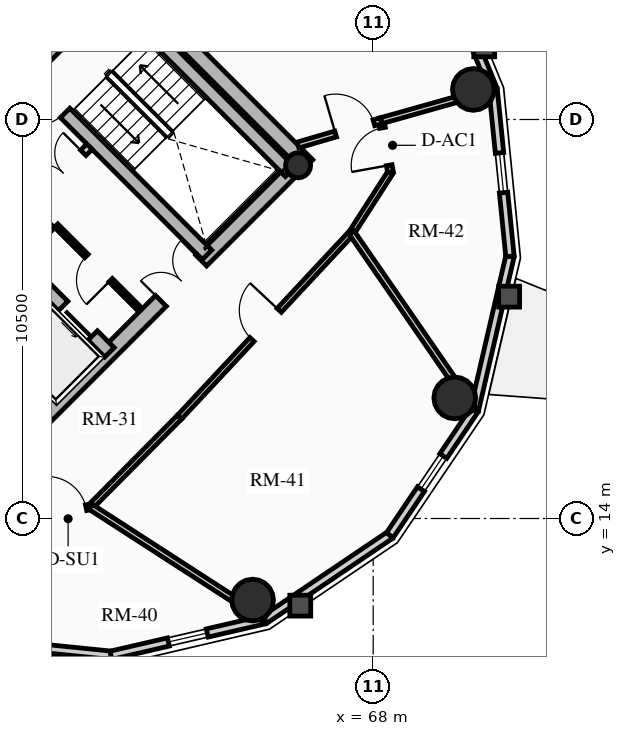
"""IFC4 building model, lengths in metres.
Left out: names, types, materials, properties, quantities, classifications, styles, units other than length and angle.
Written with IfcOpenShell. Run it as: python <this file> out.ifc"""

import sys

from ifc_helpers import new_model, si_unit, direction, frame, frame_2d, origin, origin_2d, place, context, subcontext, project, spatial, rectangle, circle, hollow_circle, extrude, source, transform, mapped, element, fill, save


model = new_model("IFC4")
c1 = context("Model", 3, precision=1e-05, world=origin(), true_north=direction((0.0, 1.0)))
c2 = subcontext(c1, "Body", "Model", "MODEL_VIEW")
j1 = project(units=[si_unit("LENGTHUNIT", "METRE"), si_unit("PLANEANGLEUNIT", "RADIAN")], contexts=[c1])
p1 = place(None, origin())
s1 = spatial("IfcSite", under=j1, at=p1, CompositionType="ELEMENT")
p2 = place(p1, origin())
s2 = spatial("IfcBuilding", under=s1, at=p2, CompositionType="ELEMENT")
p3 = place(p2, frame((0.0, 0.0, 205.39)))
s3 = spatial("IfcBuildingStorey", under=s2, at=p3, CompositionType="ELEMENT", Elevation=205.39)
p4 = place(p3, frame((66.268, 23.298, 0.0), z_axis=(0.0, 0.0, 1.0), x_axis=(-0.707106781187, 0.707106781187, 0.0)))
e1 = element("IfcWall", 1, at=p4, inside=s3, PredefinedType="SHEAR", context=c2, shape_type="SweptSolid", body=[
    extrude(rectangle(XDim=14.1, YDim=0.4, at=frame_2d((7.05, 0.0))), origin(), (0.0, 0.0, 1.0), 2.91),
])
p5 = place(p3, frame((58.561, 15.873, 0.0), z_axis=(0.0, 0.0, 1.0), x_axis=(0.707106781187, 0.707106781187, 0.0)))
e2 = element("IfcWall", 2, at=p5, inside=s3, PredefinedType="SHEAR", context=c2, shape_type="SweptSolid", body=[
    extrude(rectangle(XDim=10.7, YDim=0.4, at=frame_2d((5.35, 0.0))), origin(), (0.0, 0.0, 1.0), 2.91),
])
m1 = source(origin(), c2, "Body", "SweptSolid", [
    extrude(rectangle(XDim=1.5, YDim=2.02, at=frame_2d((0.75, 1.01))), frame((0.0, 0.21, 0.0), z_axis=(0.0, -1.0, 0.0), x_axis=(1.0, 0.0, 0.0)), (0.0, 0.0, 1.0), 0.42),
])
p6 = place(p5, frame((5.45, 0.0, 0.0)))
e3 = element("IfcOpeningElement", 3, at=p6, cuts=e2, PredefinedType="OPENING", context=c2, shape_type="MappedRepresentation", body=[
    mapped(m1, transform((0.0, 0.0, 0.0), x_axis=(1.0, 0.0, 0.0), y_axis=(0.0, 1.0, 0.0), z_axis=(0.0, 0.0, 1.0), scale=1.0)),
])
p7 = place(p3, frame((61.06, 18.373, 0.0), z_axis=(0.0, 0.0, 1.0), x_axis=(-0.707106781187, 0.707106781187, 0.0)))
e4 = element("IfcWall", 4, at=p7, inside=s3, PredefinedType="SHEAR", context=c2, shape_type="SweptSolid", body=[
    extrude(rectangle(XDim=13.7, YDim=0.35, at=frame_2d((6.85, 0.0))), origin(), (0.0, 0.0, 1.0), 2.91),
])
m2 = source(origin(), c2, "Body", "SweptSolid", [
    extrude(rectangle(XDim=1.1, YDim=2.015, at=frame_2d((0.55, 1.007))), frame((0.0, 0.185, 0.0), z_axis=(0.0, -1.0, 0.0), x_axis=(1.0, 0.0, 0.0)), (0.0, 0.0, 1.0), 0.37),
])
p8 = place(p7, frame((4.85, 0.0, 0.0)))
e5 = element("IfcOpeningElement", 5, at=p8, cuts=e4, PredefinedType="OPENING", context=c2, shape_type="MappedRepresentation", body=[
    mapped(m2, transform((0.0, 0.0, 0.0), x_axis=(1.0, 0.0, 0.0), y_axis=(0.0, 1.0, 0.0), z_axis=(0.0, 0.0, 1.0), scale=1.0)),
])
p9 = place(p7, frame((0.625, 0.0, 0.0)))
e6 = element("IfcOpeningElement", 6, at=p9, cuts=e4, PredefinedType="OPENING", context=c2, shape_type="MappedRepresentation", body=[
    mapped(m2, transform((0.0, 0.0, 0.0), x_axis=(1.0, 0.0, 0.0), y_axis=(0.0, 1.0, 0.0), z_axis=(0.0, 0.0, 1.0), scale=1.0)),
])
p10 = place(p7, frame((2.625, 0.0, 0.0)))
e7 = element("IfcOpeningElement", 7, at=p10, cuts=e4, PredefinedType="OPENING", context=c2, shape_type="MappedRepresentation", body=[
    mapped(m2, transform((0.0, 0.0, 0.0), x_axis=(1.0, 0.0, 0.0), y_axis=(0.0, 1.0, 0.0), z_axis=(0.0, 0.0, 1.0), scale=1.0)),
])
m3 = source(origin(), c2, "Body", "SweptSolid", [
    extrude(rectangle(XDim=1.15, YDim=2.02, at=frame_2d((0.575, 1.01))), frame((0.0, 0.185, 0.0), z_axis=(0.0, -1.0, 0.0), x_axis=(1.0, 0.0, 0.0)), (0.0, 0.0, 1.0), 0.37),
])
p11 = place(p7, frame((7.27, 0.0, 0.0)))
e8 = element("IfcOpeningElement", 8, at=p11, cuts=e4, PredefinedType="OPENING", context=c2, shape_type="MappedRepresentation", body=[
    mapped(m3, transform((0.0, 0.0, 0.0), x_axis=(1.0, 0.0, 0.0), y_axis=(0.0, 1.0, 0.0), z_axis=(0.0, 0.0, 1.0), scale=1.0)),
])
p12 = place(p3, frame((63.627, 20.94, 0.0), z_axis=(0.0, 0.0, 1.0), x_axis=(-0.707119496762, 0.707094065383, 0.0)))
e9 = element("IfcWall", 9, at=p12, inside=s3, PredefinedType="SHEAR", context=c2, shape_type="SweptSolid", body=[
    extrude(rectangle(XDim=9.6, YDim=0.35, at=frame_2d((4.8, 0.0))), origin(), (0.0, 0.0, 1.0), 2.91),
])
p13 = place(p12, frame((5.28, 0.0, 0.0)))
e10 = element("IfcOpeningElement", 10, at=p13, cuts=e9, PredefinedType="OPENING", context=c2, shape_type="MappedRepresentation", body=[
    mapped(m3, transform((0.0, 0.0, 0.0), x_axis=(1.0, 0.0, 0.0), y_axis=(0.0, 1.0, 0.0), z_axis=(0.0, 0.0, 1.0), scale=1.0)),
])
p14 = place(p3, frame((65.812, 23.125, 0.0), z_axis=(0.0, 0.0, 1.0), x_axis=(-0.707106781187, 0.707106781187, 0.0)))
e11 = element("IfcWall", 11, at=p14, inside=s3, PredefinedType="SHEAR", context=c2, shape_type="SweptSolid", body=[
    extrude(rectangle(XDim=6.695, YDim=0.35, at=frame_2d((3.348, 0.0))), origin(), (0.0, 0.0, 1.0), 2.91),
])
p15 = place(p3, frame((58.893, 25.674, 0.0), z_axis=(0.0, 0.0, 1.0), x_axis=(0.707106781187, 0.707106781187, 0.0)))
e12 = element("IfcWall", 12, at=p15, inside=s3, PredefinedType="SHEAR", context=c2, shape_type="SweptSolid", body=[
    extrude(rectangle(XDim=3.285, YDim=0.35, at=frame_2d((1.643, 0.0))), origin(), (0.0, 0.0, 1.0), 2.91),
])
p16 = place(p3, frame((66.024, 23.294, 0.0), z_axis=(0.0, 0.0, 1.0), x_axis=(0.707106781187, 0.707106781187, 0.0)))
e13 = element("IfcColumn", 13, at=p16, inside=s3, PredefinedType="COLUMN", context=c2, shape_type="SweptSolid", body=[
    extrude(hollow_circle(Radius=0.33, WallThickness=0.025, at=origin_2d()), origin(), (0.0, 0.0, 1.0), 2.91),
])
for number, where, z_axis, x_axis in (
    (14, (64.827, 11.854, 0.0), (0.0, 0.0, 1.0), (1.0, 0.0, 0.0)),
    (15, (70.146, 17.173, 0.0), (0.0, 0.0, 1.0), (1.0, 0.0, 0.0)),
    (16, (70.635, 25.291, 0.0), (0.0, 0.0, 1.0), (1.0, 0.0, 0.0)),
):
    element("IfcColumn", number, at=place(p3, frame(where, z_axis=z_axis, x_axis=x_axis)), inside=s3, PredefinedType="USERDEFINED", context=c2, shape_type="SweptSolid", body=[
        extrude(circle(Radius=0.55, at=origin_2d()), origin(), (0.0, 0.0, 1.0), 2.91),
    ])
p17 = place(p3, frame((61.1, 10.401, 0.0), z_axis=(0.0, 0.0, 1.0), x_axis=(-0.994929930991, 0.100570534541, 0.0)))
e17 = element("IfcWall", 17, at=p17, inside=s3, PredefinedType="SOLIDWALL", context=c2, shape_type="SweptSolid", body=[
    extrude(rectangle(XDim=4.418, YDim=0.22, at=frame_2d((2.209, 0.0))), origin(), (0.0, 0.0, 1.0), 2.322),
])
m4 = source(origin(), c2, "Body", "SweptSolid", [
    extrude(rectangle(XDim=1.05, YDim=1.3, at=frame_2d((0.525, 0.65))), frame((0.0, 0.12, 0.0), z_axis=(0.0, -1.0, 0.0), x_axis=(1.0, 0.0, 0.0)), (0.0, 0.0, 1.0), 0.24),
])
p18 = place(p17, frame((1.684, 0.0, 0.65)))
e18 = element("IfcOpeningElement", 18, at=p18, cuts=e17, PredefinedType="OPENING", context=c2, shape_type="MappedRepresentation", body=[
    mapped(m4, transform((0.0, 0.0, 0.0), x_axis=(1.0, 0.0, 0.0), y_axis=(0.0, 1.0, 0.0), z_axis=(0.0, 0.0, 1.0), scale=1.0)),
])
p19 = place(p3, frame((65.144, 11.337, 0.0), z_axis=(0.0, 0.0, 1.0), x_axis=(-0.974249228678, -0.225473813158, 0.0)))
e19 = element("IfcWall", 19, at=p19, inside=s3, PredefinedType="SOLIDWALL", context=c2, shape_type="SweptSolid", body=[
    extrude(rectangle(XDim=4.15, YDim=0.22, at=frame_2d((2.075, 0.0))), origin(), (0.0, 0.0, 1.0), 2.322),
])
p20 = place(p19, frame((1.55, 0.0, 0.65)))
e20 = element("IfcOpeningElement", 20, at=p20, cuts=e19, PredefinedType="OPENING", context=c2, shape_type="MappedRepresentation", body=[
    mapped(m4, transform((0.0, 0.0, 0.0), x_axis=(1.0, 0.0, 0.0), y_axis=(0.0, 1.0, 0.0), z_axis=(0.0, 0.0, 1.0), scale=1.0)),
])
p21 = place(p3, frame((68.439, 13.561, 0.0), z_axis=(0.0, 0.0, 1.0), x_axis=(-0.828833723692, -0.559495003079, 0.0)))
e21 = element("IfcWall", 21, at=p21, inside=s3, PredefinedType="SOLIDWALL", context=c2, shape_type="SweptSolid", body=[
    extrude(rectangle(XDim=3.976, YDim=0.22, at=frame_2d((1.988, 0.0))), origin(), (0.0, 0.0, 1.0), 2.322),
])
p22 = place(p3, frame((70.663, 16.856, 0.0), z_axis=(0.0, 0.0, 1.0), x_axis=(-0.559495003079, -0.828833723692, 0.0)))
e22 = element("IfcWall", 22, at=p22, inside=s3, PredefinedType="SOLIDWALL", context=c2, shape_type="SweptSolid", body=[
    extrude(rectangle(XDim=3.976, YDim=0.22, at=frame_2d((1.988, 0.0))), origin(), (0.0, 0.0, 1.0), 2.322),
])
p23 = place(p22, frame((1.463, 0.0, 0.65)))
e23 = element("IfcOpeningElement", 23, at=p23, cuts=e22, PredefinedType="OPENING", context=c2, shape_type="MappedRepresentation", body=[
    mapped(m4, transform((0.0, 0.0, 0.0), x_axis=(1.0, 0.0, 0.0), y_axis=(0.0, 1.0, 0.0), z_axis=(0.0, 0.0, 1.0), scale=1.0)),
])
p24 = place(p3, frame((71.599, 20.9, 0.0), z_axis=(0.0, 0.0, 1.0), x_axis=(-0.225473813158, -0.974249228678, 0.0)))
e24 = element("IfcWall", 24, at=p24, inside=s3, PredefinedType="SOLIDWALL", context=c2, shape_type="SweptSolid", body=[
    extrude(rectangle(XDim=4.15, YDim=0.22, at=frame_2d((2.075, 0.0))), origin(), (0.0, 0.0, 1.0), 2.322),
])
p25 = place(p3, frame((71.155, 25.295, 0.0), z_axis=(0.0, 0.0, 1.0), x_axis=(0.100570534541, -0.994929930991, 0.0)))
e25 = element("IfcWall", 25, at=p25, inside=s3, PredefinedType="SOLIDWALL", context=c2, shape_type="SweptSolid", body=[
    extrude(rectangle(XDim=4.418, YDim=0.22, at=frame_2d((2.209, 0.0))), origin(), (0.0, 0.0, 1.0), 2.322),
])
p26 = place(p25, frame((1.684, 0.0, 0.65)))
e26 = element("IfcOpeningElement", 26, at=p26, cuts=e25, PredefinedType="OPENING", context=c2, shape_type="MappedRepresentation", body=[
    mapped(m4, transform((0.0, 0.0, 0.0), x_axis=(1.0, 0.0, 0.0), y_axis=(0.0, 1.0, 0.0), z_axis=(0.0, 0.0, 1.0), scale=1.0)),
])
p27 = place(p3, frame((69.374, 29.613, 0.0), z_axis=(0.0, 0.0, 1.0), x_axis=(0.381309704956, -0.924447353237, 0.0)))
e27 = element("IfcWall", 27, at=p27, inside=s3, PredefinedType="SOLIDWALL", context=c2, shape_type="SweptSolid", body=[
    extrude(rectangle(XDim=4.671, YDim=0.22, at=frame_2d((2.335, 0.0))), origin(), (0.0, 0.0, 1.0), 2.322),
])
p28 = place(p3, frame((58.214, 21.467, 0.0), z_axis=(0.0, 0.0, 1.0), x_axis=(0.707106781187, 0.707106781187, 0.0)))
e28 = element("IfcWall", 28, at=p28, inside=s3, PredefinedType="PARTITIONING", context=c2, shape_type="SweptSolid", body=[
    extrude(rectangle(XDim=3.28, YDim=0.2, at=frame_2d((1.64, 0.0))), origin(), (0.0, 0.0, 1.0), 2.685),
])
m5 = source(origin(), c2, "Body", "SweptSolid", [
    extrude(rectangle(XDim=1.5, YDim=2.02, at=frame_2d((0.75, 1.01))), frame((0.0, 0.11, 0.0), z_axis=(0.0, -1.0, 0.0), x_axis=(1.0, 0.0, 0.0)), (0.0, 0.0, 1.0), 0.22),
])
p29 = place(p28, frame((1.55, 0.0, 0.0)))
e29 = element("IfcOpeningElement", 29, at=p29, cuts=e28, PredefinedType="OPENING", context=c2, shape_type="MappedRepresentation", body=[
    mapped(m5, transform((0.0, 0.0, 0.0), x_axis=(1.0, 0.0, 0.0), y_axis=(0.0, 1.0, 0.0), z_axis=(0.0, 0.0, 1.0), scale=1.0)),
])
p30 = place(p3, frame((61.835, 19.529, 0.0), z_axis=(0.0, 0.0, 1.0), x_axis=(-0.707146413884, 0.707067146267, 0.0)))
e30 = element("IfcWall", 30, at=p30, inside=s3, PredefinedType="PARTITIONING", context=c2, shape_type="SweptSolid", body=[
    extrude(rectangle(XDim=3.08, YDim=0.125, at=frame_2d((1.54, 0.0))), origin(), (0.0, 0.0, 1.0), 2.685),
])
m6 = source(origin(), c2, "Body", "SweptSolid", [
    extrude(rectangle(XDim=0.9, YDim=2.005, at=frame_2d((0.45, 1.002))), frame((0.0, 0.073, 0.0), z_axis=(0.0, -1.0, 0.0), x_axis=(1.0, 0.0, 0.0)), (0.0, 0.0, 1.0), 0.145),
])
p31 = place(p30, frame((1.05, 0.0, 0.0)))
e31 = element("IfcOpeningElement", 31, at=p31, cuts=e30, PredefinedType="OPENING", context=c2, shape_type="MappedRepresentation", body=[
    mapped(m6, transform((0.0, 0.0, 0.0), x_axis=(1.0, 0.0, 0.0), y_axis=(0.0, 1.0, 0.0), z_axis=(0.0, 0.0, 1.0), scale=1.0)),
])
p32 = place(p3, frame((58.794, 20.915, 0.0), z_axis=(0.0, 0.0, 1.0), x_axis=(0.707106781187, 0.707106781187, 0.0)))
e32 = element("IfcWall", 32, at=p32, inside=s3, PredefinedType="PARTITIONING", context=c2, shape_type="SweptSolid", body=[
    extrude(rectangle(XDim=1.1, YDim=0.125, at=frame_2d((0.55, 0.0))), origin(), (0.0, 0.0, 1.0), 2.685),
])
p33 = place(p3, frame((59.008, 13.963, 0.0), z_axis=(0.0, 0.0, 1.0), x_axis=(0.976020856791, 0.21767702476, 0.0)))
e33 = element("IfcWall", 33, at=p33, inside=s3, PredefinedType="PARTITIONING", context=c2, shape_type="SweptSolid", body=[
    extrude(rectangle(XDim=1.593, YDim=0.15, at=frame_2d((0.796, 0.0))), origin(), (0.0, 0.0, 1.0), 2.255),
])
m7 = source(origin(), c2, "Body", "SweptSolid", [
    extrude(rectangle(XDim=1.05, YDim=2.015, at=frame_2d((0.525, 1.007))), frame((0.0, 0.085, 0.0), z_axis=(0.0, -1.0, 0.0), x_axis=(1.0, 0.0, 0.0)), (0.0, 0.0, 1.0), 0.17),
])
p34 = place(p33, frame((0.423, 0.0, 0.0)))
e34 = element("IfcOpeningElement", 34, at=p34, cuts=e33, PredefinedType="OPENING", context=c2, shape_type="MappedRepresentation", body=[
    mapped(m7, transform((0.0, 0.0, 0.0), x_axis=(1.0, 0.0, 0.0), y_axis=(0.0, 1.0, 0.0), z_axis=(0.0, 0.0, 1.0), scale=1.0)),
])
p35 = place(p3, frame((60.562, 14.31, 0.0), z_axis=(0.0, 0.0, 1.0), x_axis=(0.704566236161, 0.709638230975, 0.0)))
e35 = element("IfcWall", 35, at=p35, inside=s3, PredefinedType="PARTITIONING", context=c2, shape_type="SweptSolid", body=[
    extrude(rectangle(XDim=3.321, YDim=0.15, at=frame_2d((1.661, 0.0))), origin(), (0.0, 0.0, 1.0), 2.322),
])
p36 = place(p3, frame((62.903, 16.667, 0.0), z_axis=(0.0, 0.0, 1.0), x_axis=(0.682371947497, 0.731005147225, 0.0)))
e36 = element("IfcWall", 36, at=p36, inside=s3, PredefinedType="PARTITIONING", context=c2, shape_type="SweptSolid", body=[
    extrude(rectangle(XDim=6.642, YDim=0.15, at=frame_2d((3.321, 0.0))), origin(), (0.0, 0.0, 1.0), 2.255),
])
p37 = place(p36, frame((2.796, 0.0, 0.0)))
e37 = element("IfcOpeningElement", 37, at=p37, cuts=e36, PredefinedType="OPENING", context=c2, shape_type="MappedRepresentation", body=[
    mapped(m7, transform((0.0, 0.0, 0.0), x_axis=(1.0, 0.0, 0.0), y_axis=(0.0, 1.0, 0.0), z_axis=(0.0, 0.0, 1.0), scale=1.0)),
])
p38 = place(p3, frame((67.435, 21.521, 0.0), z_axis=(0.0, 0.0, 1.0), x_axis=(0.540777197838, 0.841165870859, 0.0)))
e38 = element("IfcWall", 38, at=p38, inside=s3, PredefinedType="PARTITIONING", context=c2, shape_type="SweptSolid", body=[
    extrude(rectangle(XDim=1.888, YDim=0.15, at=frame_2d((0.944, 0.0))), origin(), (0.0, 0.0, 1.0), 2.255),
])
p39 = place(p3, frame((68.456, 23.11, 0.0), z_axis=(0.0, 0.0, 1.0), x_axis=(-0.1772522795, 0.984165448191, 0.0)))
e39 = element("IfcWall", 39, at=p39, inside=s3, PredefinedType="PARTITIONING", context=c2, shape_type="SweptSolid", body=[
    extrude(rectangle(XDim=1.382, YDim=0.15, at=frame_2d((0.691, 0.0))), origin(), (0.0, 0.0, 1.0), 2.322),
])
m8 = source(origin(), c2, "Body", "SweptSolid", [
    extrude(rectangle(XDim=1.0, YDim=2.015, at=frame_2d((0.5, 1.007))), frame((0.0, 0.085, 0.0), z_axis=(0.0, -1.0, 0.0), x_axis=(1.0, 0.0, 0.0)), (0.0, 0.0, 1.0), 0.17),
])
p40 = place(p39, frame((0.191, 0.0, 0.0)))
e40 = element("IfcOpeningElement", 40, at=p40, cuts=e39, PredefinedType="OPENING", context=c2, shape_type="MappedRepresentation", body=[
    mapped(m8, transform((0.0, 0.0, 0.0), x_axis=(1.0, 0.0, 0.0), y_axis=(0.0, 1.0, 0.0), z_axis=(0.0, 0.0, 1.0), scale=1.0)),
])
p41 = place(p3, frame((60.562, 14.31, 0.0), z_axis=(0.0, 0.0, 1.0), x_axis=(0.839858797161, -0.542804938105, 0.0)))
e41 = element("IfcWall", 41, at=p41, inside=s3, PredefinedType="PARTITIONING", context=c2, shape_type="SweptSolid", body=[
    extrude(rectangle(XDim=5.444, YDim=0.16, at=frame_2d((2.722, 0.0))), origin(), (0.0, 0.0, 1.0), 2.322),
])
p42 = place(p3, frame((67.435, 21.521, 0.0), z_axis=(0.0, 0.0, 1.0), x_axis=(0.567700677576, -0.823235045828, 0.0)))
e42 = element("IfcWall", 42, at=p42, inside=s3, PredefinedType="PARTITIONING", context=c2, shape_type="SweptSolid", body=[
    extrude(rectangle(XDim=5.656, YDim=0.16, at=frame_2d((2.828, 0.0))), origin(), (0.0, 0.0, 1.0), 2.322),
])
p43 = place(p3, frame((68.211, 24.469, 0.0), z_axis=(0.0, 0.0, 1.0), x_axis=(0.962605107736, 0.270908483735, 0.0)))
e43 = element("IfcWall", 43, at=p43, inside=s3, PredefinedType="PARTITIONING", context=c2, shape_type="SweptSolid", body=[
    extrude(rectangle(XDim=3.038, YDim=0.16, at=frame_2d((1.519, 0.0))), origin(), (0.0, 0.0, 1.0), 2.322),
])
p44 = place(p3, frame((66.021, 23.828, 0.0), z_axis=(0.0, 0.0, 1.0), x_axis=(0.959727558294, 0.280932400856, 0.0)))
e44 = element("IfcWall", 44, at=p44, inside=s3, PredefinedType="PARTITIONING", context=c2, shape_type="SweptSolid", body=[
    extrude(rectangle(XDim=2.282, YDim=0.16, at=frame_2d((1.141, 0.0))), origin(), (0.0, 0.0, 1.0), 2.255),
])
m9 = source(origin(), c2, "Body", "SweptSolid", [
    extrude(rectangle(XDim=1.05, YDim=2.015, at=frame_2d((0.525, 1.007))), frame((0.0, 0.09, 0.0), z_axis=(0.0, -1.0, 0.0), x_axis=(1.0, 0.0, 0.0)), (0.0, 0.0, 1.0), 0.18),
])
p45 = place(p44, frame((1.032, 0.0, 0.0)))
e45 = element("IfcOpeningElement", 45, at=p45, cuts=e44, PredefinedType="OPENING", context=c2, shape_type="MappedRepresentation", body=[
    mapped(m9, transform((0.0, 0.0, 0.0), x_axis=(1.0, 0.0, 0.0), y_axis=(0.0, 1.0, 0.0), z_axis=(0.0, 0.0, 1.0), scale=1.0)),
])
m10 = source(origin(), c2, "Body", "SweptSolid", [
    extrude(rectangle(XDim=1.05, YDim=1.3, at=frame_2d((0.525, 0.65))), frame((0.0, 0.03, 0.0), z_axis=(0.0, -1.0, 0.0), x_axis=(1.0, 0.0, 0.0)), (0.0, 0.0, 1.0), 0.06),
])
p46 = place(p20, origin())
e46 = element("IfcWindow", 46, at=p46, inside=s3, PartitioningType="SINGLE_PANEL", PredefinedType="WINDOW", context=c2, shape_type="MappedRepresentation", body=[
    mapped(m10, transform((0.0, 0.0, 0.0), x_axis=(1.0, 0.0, 0.0), y_axis=(0.0, 1.0, 0.0), z_axis=(0.0, 0.0, 1.0), scale=1.0)),
])
fill(e20, e46)
p47 = place(p23, origin())
e47 = element("IfcWindow", 47, at=p47, inside=s3, PartitioningType="SINGLE_PANEL", PredefinedType="WINDOW", context=c2, shape_type="MappedRepresentation", body=[
    mapped(m10, transform((0.0, 0.0, 0.0), x_axis=(1.0, 0.0, 0.0), y_axis=(0.0, 1.0, 0.0), z_axis=(0.0, 0.0, 1.0), scale=1.0)),
])
fill(e23, e47)
p48 = place(p26, origin())
e48 = element("IfcWindow", 48, at=p48, inside=s3, PartitioningType="SINGLE_PANEL", PredefinedType="WINDOW", context=c2, shape_type="MappedRepresentation", body=[
    mapped(m10, transform((0.0, 0.0, 0.0), x_axis=(1.0, 0.0, 0.0), y_axis=(0.0, 1.0, 0.0), z_axis=(0.0, 0.0, 1.0), scale=1.0)),
])
fill(e26, e48)
m11 = source(origin(), c2, "Body", "SweptSolid", [
    extrude(rectangle(XDim=1.1, YDim=2.015, at=frame_2d((0.55, 1.007))), frame((0.0, 0.025, 0.0), z_axis=(0.0, -1.0, 0.0), x_axis=(1.0, 0.0, 0.0)), (0.0, 0.0, 1.0), 0.05),
])
p49 = place(p9, origin())
e49 = element("IfcDoor", 49, at=p49, inside=s3, OperationType="SLIDING_TO_LEFT", PredefinedType="DOOR", context=c2, shape_type="MappedRepresentation", body=[
    mapped(m11, transform((0.0, 0.0, 0.0), x_axis=(1.0, 0.0, 0.0), y_axis=(0.0, 1.0, 0.0), z_axis=(0.0, 0.0, 1.0), scale=1.0)),
])
fill(e6, e49)
m12 = source(origin(), c2, "Body", "SweptSolid", [
    extrude(rectangle(XDim=1.15, YDim=2.02, at=frame_2d((0.575, 1.01))), frame((0.0, 0.025, 0.0), z_axis=(0.0, -1.0, 0.0), x_axis=(1.0, 0.0, 0.0)), (0.0, 0.0, 1.0), 0.05),
])
p50 = place(p13, origin())
e50 = element("IfcDoor", 50, at=p50, inside=s3, OperationType="SINGLE_SWING_RIGHT", PredefinedType="DOOR", context=c2, shape_type="MappedRepresentation", body=[
    mapped(m12, transform((0.0, 0.0, 0.0), x_axis=(1.0, 0.0, 0.0), y_axis=(0.0, 1.0, 0.0), z_axis=(0.0, 0.0, 1.0), scale=1.0)),
])
fill(e10, e50)
m13 = source(origin(), c2, "Body", "SweptSolid", [
    extrude(rectangle(XDim=1.5, YDim=2.02, at=frame_2d((0.75, 1.01))), frame((0.0, 0.025, 0.0), z_axis=(0.0, -1.0, 0.0), x_axis=(1.0, 0.0, 0.0)), (0.0, 0.0, 1.0), 0.05),
])
p51 = place(p6, origin())
e51 = element("IfcDoor", 51, at=p51, inside=s3, OperationType="DOUBLE_DOOR_SINGLE_SWING", PredefinedType="DOOR", context=c2, shape_type="MappedRepresentation", body=[
    mapped(m13, transform((0.0, 0.0, 0.0), x_axis=(1.0, 0.0, 0.0), y_axis=(0.0, 1.0, 0.0), z_axis=(0.0, 0.0, 1.0), scale=1.0)),
])
fill(e3, e51)
p52 = place(p29, origin())
e52 = element("IfcDoor", 52, at=p52, inside=s3, OperationType="DOUBLE_DOOR_SINGLE_SWING", PredefinedType="DOOR", context=c2, shape_type="MappedRepresentation", body=[
    mapped(m13, transform((0.0, 0.0, 0.0), x_axis=(1.0, 0.0, 0.0), y_axis=(0.0, 1.0, 0.0), z_axis=(0.0, 0.0, 1.0), scale=1.0)),
])
fill(e29, e52)
m14 = source(origin(), c2, "Body", "SweptSolid", [
    extrude(rectangle(XDim=0.9, YDim=2.005, at=frame_2d((0.45, 1.002))), frame((0.0, 0.025, 0.0), z_axis=(0.0, -1.0, 0.0), x_axis=(1.0, 0.0, 0.0)), (0.0, 0.0, 1.0), 0.05),
])
p53 = place(p31, origin())
e53 = element("IfcDoor", 53, at=p53, inside=s3, OperationType="SINGLE_SWING_LEFT", PredefinedType="DOOR", context=c2, shape_type="MappedRepresentation", body=[
    mapped(m14, transform((0.0, 0.0, 0.0), x_axis=(1.0, 0.0, 0.0), y_axis=(0.0, 1.0, 0.0), z_axis=(0.0, 0.0, 1.0), scale=1.0)),
])
fill(e31, e53)
m15 = source(origin(), c2, "Body", "SweptSolid", [
    extrude(rectangle(XDim=1.05, YDim=2.015, at=frame_2d((0.525, 1.007))), frame((0.0, 0.025, 0.0), z_axis=(0.0, -1.0, 0.0), x_axis=(1.0, 0.0, 0.0)), (0.0, 0.0, 1.0), 0.05),
])
p54 = place(p45, origin())
e54 = element("IfcDoor", 54, at=p54, inside=s3, OperationType="SINGLE_SWING_LEFT", PredefinedType="DOOR", context=c2, shape_type="MappedRepresentation", body=[
    mapped(m15, transform((0.0, 0.0, 0.0), x_axis=(1.0, 0.0, 0.0), y_axis=(0.0, 1.0, 0.0), z_axis=(0.0, 0.0, 1.0), scale=1.0)),
])
fill(e45, e54)
p55 = place(p34, origin())
e55 = element("IfcDoor", 55, at=p55, inside=s3, OperationType="SINGLE_SWING_LEFT", PredefinedType="DOOR", context=c2, shape_type="MappedRepresentation", body=[
    mapped(m15, transform((0.0, 0.0, 0.0), x_axis=(1.0, 0.0, 0.0), y_axis=(0.0, 1.0, 0.0), z_axis=(0.0, 0.0, 1.0), scale=1.0)),
])
fill(e34, e55)
p56 = place(p37, origin())
e56 = element("IfcDoor", 56, at=p56, inside=s3, OperationType="SINGLE_SWING_RIGHT", PredefinedType="DOOR", context=c2, shape_type="MappedRepresentation", body=[
    mapped(m15, transform((0.0, 0.0, 0.0), x_axis=(1.0, 0.0, 0.0), y_axis=(0.0, 1.0, 0.0), z_axis=(0.0, 0.0, 1.0), scale=1.0)),
])
fill(e37, e56)
m16 = source(origin(), c2, "Body", "SweptSolid", [
    extrude(rectangle(XDim=1.0, YDim=2.015, at=frame_2d((0.5, 1.007))), frame((0.0, 0.025, 0.0), z_axis=(0.0, -1.0, 0.0), x_axis=(1.0, 0.0, 0.0)), (0.0, 0.0, 1.0), 0.05),
])
p57 = place(p40, origin())
e57 = element("IfcDoor", 57, at=p57, inside=s3, OperationType="SINGLE_SWING_LEFT", PredefinedType="DOOR", context=c2, shape_type="MappedRepresentation", body=[
    mapped(m16, transform((0.0, 0.0, 0.0), x_axis=(1.0, 0.0, 0.0), y_axis=(0.0, 1.0, 0.0), z_axis=(0.0, 0.0, 1.0), scale=1.0)),
])
fill(e40, e57)
save(model, sys.argv[1])
